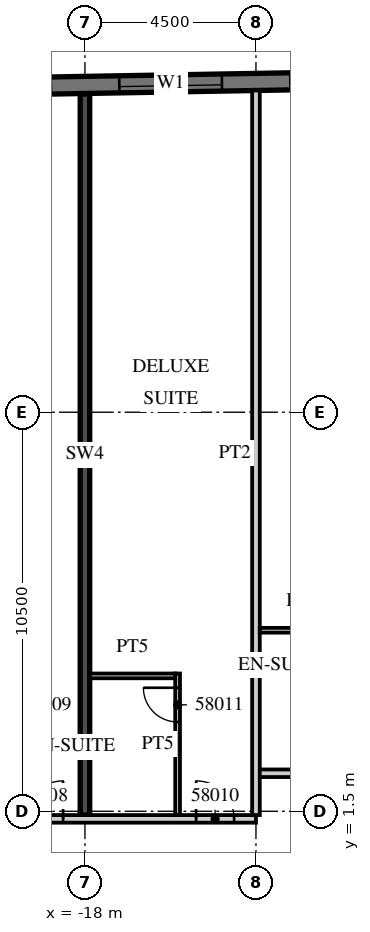
"""IFC4 building model, lengths in metres.
Left out: names, types, materials, properties, quantities, classifications, styles, units other than length and angle.
Written with IfcOpenShell. Run it as: python <this file> out.ifc"""

import sys

from ifc_helpers import new_model, si_unit, direction, frame, frame_2d, origin, place, context, subcontext, project, spatial, rectangle, extrude, element, fill, save


model = new_model("IFC4")
c1 = context("Model", 3, precision=1e-05, world=origin(), true_north=direction((0.0, 1.0)))
c2 = subcontext(c1, "Body", "Model", "MODEL_VIEW")
j1 = project(units=[si_unit("LENGTHUNIT", "METRE"), si_unit("PLANEANGLEUNIT", "RADIAN")], contexts=[c1])
p1 = place(None, origin())
s1 = spatial("IfcSite", under=j1, at=p1, CompositionType="ELEMENT")
p2 = place(p1, origin())
s2 = spatial("IfcBuilding", under=s1, at=p2, CompositionType="ELEMENT")
p3 = place(p2, frame((0.0, 0.0, 237.5)))
s3 = spatial("IfcBuildingStorey", under=s2, at=p3, CompositionType="ELEMENT", Elevation=237.5)
p4 = place(p3, frame((-18.0, 1.4, 0.0), z_axis=(0.0, 0.0, 1.0), x_axis=(0.0, 1.0, 0.0)))
e1 = element("IfcWall", 1, at=p4, inside=s3, PredefinedType="SHEAR", context=c2, shape_type="SweptSolid", body=[
    extrude(rectangle(XDim=18.974, YDim=0.25, at=frame_2d((9.487, 0.0))), origin(), (0.0, 0.0, 1.0), 3.3),
])
p5 = place(p3, frame((13.504, 21.161, 0.0), z_axis=(0.0, 0.0, 1.0), x_axis=(-0.999847763257, -0.017448504532, 0.0)))
e2 = element("IfcWall", 2, at=p5, inside=s3, PredefinedType="SOLIDWALL", context=c2, shape_type="SweptSolid", body=[
    extrude(rectangle(XDim=46.859, YDim=0.45, at=frame_2d((23.43, 0.0))), origin(), (0.0, 0.0, 1.0), 3.02),
])
p6 = place(p5, frame((0.9, 0.0, 0.45)))
e3 = element("IfcOpeningElement", 3, at=p6, cuts=e2, PredefinedType="OPENING", context=c2, shape_type="SweptSolid", body=[
    extrude(rectangle(XDim=2.7, YDim=2.25, at=frame_2d((1.35, 1.125))), frame((0.0, 0.235, 0.0), z_axis=(0.0, -1.0, 0.0), x_axis=(1.0, 0.0, 0.0)), (0.0, 0.0, 1.0), 0.47),
])
p7 = place(p5, frame((5.401, 0.0, 0.45)))
e4 = element("IfcOpeningElement", 4, at=p7, cuts=e2, PredefinedType="OPENING", context=c2, shape_type="SweptSolid", body=[
    extrude(rectangle(XDim=2.7, YDim=2.25, at=frame_2d((1.35, 1.125))), frame((0.0, 0.235, 0.0), z_axis=(0.0, -1.0, 0.0), x_axis=(1.0, 0.0, 0.0)), (0.0, 0.0, 1.0), 0.47),
])
p8 = place(p5, frame((9.902, 0.0, 0.45)))
e5 = element("IfcOpeningElement", 5, at=p8, cuts=e2, PredefinedType="OPENING", context=c2, shape_type="SweptSolid", body=[
    extrude(rectangle(XDim=2.7, YDim=2.25, at=frame_2d((1.35, 1.125))), frame((0.0, 0.235, 0.0), z_axis=(0.0, -1.0, 0.0), x_axis=(1.0, 0.0, 0.0)), (0.0, 0.0, 1.0), 0.47),
])
p9 = place(p5, frame((14.402, 0.0, 0.45)))
e6 = element("IfcOpeningElement", 6, at=p9, cuts=e2, PredefinedType="OPENING", context=c2, shape_type="SweptSolid", body=[
    extrude(rectangle(XDim=2.7, YDim=2.25, at=frame_2d((1.35, 1.125))), frame((0.0, 0.235, 0.0), z_axis=(0.0, -1.0, 0.0), x_axis=(1.0, 0.0, 0.0)), (0.0, 0.0, 1.0), 0.47),
])
p10 = place(p5, frame((18.903, 0.0, 0.45)))
e7 = element("IfcOpeningElement", 7, at=p10, cuts=e2, PredefinedType="OPENING", context=c2, shape_type="SweptSolid", body=[
    extrude(rectangle(XDim=2.7, YDim=2.25, at=frame_2d((1.35, 1.125))), frame((0.0, 0.235, 0.0), z_axis=(0.0, -1.0, 0.0), x_axis=(1.0, 0.0, 0.0)), (0.0, 0.0, 1.0), 0.47),
])
p11 = place(p5, frame((23.404, 0.0, 0.45)))
e8 = element("IfcOpeningElement", 8, at=p11, cuts=e2, PredefinedType="OPENING", context=c2, shape_type="SweptSolid", body=[
    extrude(rectangle(XDim=2.7, YDim=2.25, at=frame_2d((1.35, 1.125))), frame((0.0, 0.235, 0.0), z_axis=(0.0, -1.0, 0.0), x_axis=(1.0, 0.0, 0.0)), (0.0, 0.0, 1.0), 0.47),
])
p12 = place(p5, frame((27.904, 0.0, 0.45)))
e9 = element("IfcOpeningElement", 9, at=p12, cuts=e2, PredefinedType="OPENING", context=c2, shape_type="SweptSolid", body=[
    extrude(rectangle(XDim=2.7, YDim=2.25, at=frame_2d((1.35, 1.125))), frame((0.0, 0.235, 0.0), z_axis=(0.0, -1.0, 0.0), x_axis=(1.0, 0.0, 0.0)), (0.0, 0.0, 1.0), 0.47),
])
p13 = place(p5, frame((32.405, 0.0, 0.45)))
e10 = element("IfcOpeningElement", 10, at=p13, cuts=e2, PredefinedType="OPENING", context=c2, shape_type="SweptSolid", body=[
    extrude(rectangle(XDim=2.7, YDim=2.25, at=frame_2d((1.35, 1.125))), frame((0.0, 0.235, 0.0), z_axis=(0.0, -1.0, 0.0), x_axis=(1.0, 0.0, 0.0)), (0.0, 0.0, 1.0), 0.47),
])
p14 = place(p5, frame((36.906, 0.0, 0.45)))
e11 = element("IfcOpeningElement", 11, at=p14, cuts=e2, PredefinedType="OPENING", context=c2, shape_type="SweptSolid", body=[
    extrude(rectangle(XDim=2.7, YDim=2.25, at=frame_2d((1.35, 1.125))), frame((0.0, 0.235, 0.0), z_axis=(0.0, -1.0, 0.0), x_axis=(1.0, 0.0, 0.0)), (0.0, 0.0, 1.0), 0.47),
])
p15 = place(p5, frame((41.406, 0.0, 0.45)))
e12 = element("IfcOpeningElement", 12, at=p15, cuts=e2, PredefinedType="OPENING", context=c2, shape_type="SweptSolid", body=[
    extrude(rectangle(XDim=2.7, YDim=2.25, at=frame_2d((1.35, 1.125))), frame((0.0, 0.235, 0.0), z_axis=(0.0, -1.0, 0.0), x_axis=(1.0, 0.0, 0.0)), (0.0, 0.0, 1.0), 0.47),
])
p16 = place(p3, frame((-36.566, 1.3, 0.0), z_axis=(0.0, 0.0, 1.0), x_axis=(1.0, 0.0, 0.0)))
e13 = element("IfcWall", 13, at=p16, inside=s3, PredefinedType="PARTITIONING", context=c2, shape_type="SweptSolid", body=[
    extrude(rectangle(XDim=23.066, YDim=0.2, at=frame_2d((11.533, 0.0))), origin(), (0.0, 0.0, 1.0), 3.02),
])
p17 = place(p16, frame((1.141, 0.0, 0.0)))
e14 = element("IfcOpeningElement", 14, at=p17, cuts=e13, PredefinedType="OPENING", context=c2, shape_type="SweptSolid", body=[
    extrude(rectangle(XDim=1.0, YDim=2.1, at=frame_2d((0.5, 1.05))), frame((0.0, 0.11, 0.0), z_axis=(0.0, -1.0, 0.0), x_axis=(1.0, 0.0, 0.0)), (0.0, 0.0, 1.0), 0.22),
])
p18 = place(p16, frame((5.616, 0.0, 0.0)))
e15 = element("IfcOpeningElement", 15, at=p18, cuts=e13, PredefinedType="OPENING", context=c2, shape_type="SweptSolid", body=[
    extrude(rectangle(XDim=1.0, YDim=2.1, at=frame_2d((0.5, 1.05))), frame((0.0, 0.11, 0.0), z_axis=(0.0, -1.0, 0.0), x_axis=(1.0, 0.0, 0.0)), (0.0, 0.0, 1.0), 0.22),
])
p19 = place(p16, frame((10.141, 0.0, 0.0)))
e16 = element("IfcOpeningElement", 16, at=p19, cuts=e13, PredefinedType="OPENING", context=c2, shape_type="SweptSolid", body=[
    extrude(rectangle(XDim=1.0, YDim=2.1, at=frame_2d((0.5, 1.05))), frame((0.0, 0.11, 0.0), z_axis=(0.0, -1.0, 0.0), x_axis=(1.0, 0.0, 0.0)), (0.0, 0.0, 1.0), 0.22),
])
p20 = place(p16, frame((16.991, 0.0, 0.0)))
e17 = element("IfcOpeningElement", 17, at=p20, cuts=e13, PredefinedType="OPENING", context=c2, shape_type="SweptSolid", body=[
    extrude(rectangle(XDim=1.0, YDim=2.1, at=frame_2d((0.5, 1.05))), frame((0.0, 0.11, 0.0), z_axis=(0.0, -1.0, 0.0), x_axis=(1.0, 0.0, 0.0)), (0.0, 0.0, 1.0), 0.22),
])
p21 = place(p16, frame((21.491, 0.0, 0.0)))
e18 = element("IfcOpeningElement", 18, at=p21, cuts=e13, PredefinedType="OPENING", context=c2, shape_type="SweptSolid", body=[
    extrude(rectangle(XDim=1.0, YDim=2.1, at=frame_2d((0.5, 1.05))), frame((0.0, 0.11, 0.0), z_axis=(0.0, -1.0, 0.0), x_axis=(1.0, 0.0, 0.0)), (0.0, 0.0, 1.0), 0.22),
])
p22 = place(p3, frame((-13.5, 2.5, 0.0), z_axis=(0.0, 0.0, 1.0), x_axis=(1.0, 0.0, 0.0)))
e19 = element("IfcWall", 19, at=p22, inside=s3, PredefinedType="PARTITIONING", context=c2, shape_type="SweptSolid", body=[
    extrude(rectangle(XDim=27.0, YDim=0.2, at=frame_2d((13.5, 0.0))), origin(), (0.0, 0.0, 1.0), 3.02),
])
p23 = place(p22, frame((2.925, 0.0, 0.0)))
e20 = element("IfcOpeningElement", 20, at=p23, cuts=e19, PredefinedType="OPENING", context=c2, shape_type="SweptSolid", body=[
    extrude(rectangle(XDim=1.0, YDim=2.1, at=frame_2d((0.5, 1.05))), frame((0.0, 0.11, 0.0), z_axis=(0.0, -1.0, 0.0), x_axis=(1.0, 0.0, 0.0)), (0.0, 0.0, 1.0), 0.22),
])
p24 = place(p22, frame((7.45, 0.0, 0.0)))
e21 = element("IfcOpeningElement", 21, at=p24, cuts=e19, PredefinedType="OPENING", context=c2, shape_type="SweptSolid", body=[
    extrude(rectangle(XDim=1.0, YDim=2.1, at=frame_2d((0.5, 1.05))), frame((0.0, 0.11, 0.0), z_axis=(0.0, -1.0, 0.0), x_axis=(1.0, 0.0, 0.0)), (0.0, 0.0, 1.0), 0.22),
])
p25 = place(p22, frame((11.925, 0.0, 0.0)))
e22 = element("IfcOpeningElement", 22, at=p25, cuts=e19, PredefinedType="OPENING", context=c2, shape_type="SweptSolid", body=[
    extrude(rectangle(XDim=1.0, YDim=2.1, at=frame_2d((0.5, 1.05))), frame((0.0, 0.11, 0.0), z_axis=(0.0, -1.0, 0.0), x_axis=(1.0, 0.0, 0.0)), (0.0, 0.0, 1.0), 0.22),
])
p26 = place(p22, frame((16.45, 0.0, 0.0)))
e23 = element("IfcOpeningElement", 23, at=p26, cuts=e19, PredefinedType="OPENING", context=c2, shape_type="SweptSolid", body=[
    extrude(rectangle(XDim=1.0, YDim=2.1, at=frame_2d((0.5, 1.05))), frame((0.0, 0.11, 0.0), z_axis=(0.0, -1.0, 0.0), x_axis=(1.0, 0.0, 0.0)), (0.0, 0.0, 1.0), 0.22),
])
p27 = place(p22, frame((18.55, 0.0, 0.0)))
e24 = element("IfcOpeningElement", 24, at=p27, cuts=e19, PredefinedType="OPENING", context=c2, shape_type="SweptSolid", body=[
    extrude(rectangle(XDim=1.0, YDim=2.1, at=frame_2d((0.5, 1.05))), frame((0.0, 0.11, 0.0), z_axis=(0.0, -1.0, 0.0), x_axis=(1.0, 0.0, 0.0)), (0.0, 0.0, 1.0), 0.22),
])
p28 = place(p22, frame((23.075, 0.0, 0.0)))
e25 = element("IfcOpeningElement", 25, at=p28, cuts=e19, PredefinedType="OPENING", context=c2, shape_type="SweptSolid", body=[
    extrude(rectangle(XDim=1.0, YDim=2.1, at=frame_2d((0.5, 1.05))), frame((0.0, 0.11, 0.0), z_axis=(0.0, -1.0, 0.0), x_axis=(1.0, 0.0, 0.0)), (0.0, 0.0, 1.0), 0.22),
])
p29 = place(p3, frame((-13.5, 1.4, 0.0), z_axis=(0.0, 0.0, 1.0), x_axis=(0.0, 1.0, 0.0)))
e26 = element("IfcWall", 26, at=p29, inside=s3, PredefinedType="PARTITIONING", context=c2, shape_type="SweptSolid", body=[
    extrude(rectangle(XDim=19.065, YDim=0.2, at=frame_2d((9.533, 0.0))), origin(), (0.0, 0.0, 1.0), 3.02),
])
p30 = place(p3, frame((-15.562, 1.4, 0.0), z_axis=(0.0, 0.0, 1.0), x_axis=(0.0, 1.0, 0.0)))
e27 = element("IfcWall", 27, at=p30, inside=s3, PredefinedType="PARTITIONING", context=c2, shape_type="SweptSolid", body=[
    extrude(rectangle(XDim=3.725, YDim=0.125, at=frame_2d((1.863, 0.0))), origin(), (0.0, 0.0, 1.0), 3.02),
])
p31 = place(p30, frame((2.45, 0.0, 0.0)))
e28 = element("IfcOpeningElement", 28, at=p31, cuts=e27, PredefinedType="OPENING", context=c2, shape_type="SweptSolid", body=[
    extrude(rectangle(XDim=0.9, YDim=2.1, at=frame_2d((0.45, 1.05))), frame((0.0, 0.073, 0.0), z_axis=(0.0, -1.0, 0.0), x_axis=(1.0, 0.0, 0.0)), (0.0, 0.0, 1.0), 0.145),
])
for number, where, z_axis, x_axis in (
    (29, (-17.875, 5.062, 0.0), (0.0, 0.0, 1.0), (1.0, 0.0, 0.0)),
    (30, (-13.4, 6.263, 0.0), (0.0, 0.0, 1.0), (1.0, 0.0, 0.0)),
):
    element("IfcWall", number, at=place(p3, frame(where, z_axis=z_axis, x_axis=x_axis)), inside=s3, PredefinedType="PARTITIONING", context=c2, shape_type="SweptSolid", body=[
        extrude(rectangle(XDim=2.25, YDim=0.125, at=frame_2d((1.125, 0.0))), origin(), (0.0, 0.0, 1.0), 3.02),
    ])
p32 = place(p12, origin())
e31 = element("IfcWindow", 31, at=p32, inside=s3, PartitioningType="SINGLE_PANEL", PredefinedType="WINDOW", context=c2, shape_type="SweptSolid", body=[
    extrude(rectangle(XDim=2.7, YDim=2.25, at=frame_2d((1.35, 1.125))), frame((0.0, 0.09, 0.0), z_axis=(0.0, -1.0, 0.0), x_axis=(1.0, 0.0, 0.0)), (0.0, 0.0, 1.0), 0.06),
])
fill(e9, e31)
p33 = place(p20, origin())
e32 = element("IfcDoor", 32, at=p33, inside=s3, OperationType="SINGLE_SWING_RIGHT", PredefinedType="DOOR", context=c2, shape_type="SweptSolid", body=[
    extrude(rectangle(XDim=1.0, YDim=2.1, at=frame_2d((0.5, 1.05))), frame((0.0, 0.025, 0.0), z_axis=(0.0, -1.0, 0.0), x_axis=(1.0, 0.0, 0.0)), (0.0, 0.0, 1.0), 0.05),
])
fill(e17, e32)
p34 = place(p21, origin())
e33 = element("IfcDoor", 33, at=p34, inside=s3, OperationType="SINGLE_SWING_LEFT", PredefinedType="DOOR", context=c2, shape_type="SweptSolid", body=[
    extrude(rectangle(XDim=1.0, YDim=2.1, at=frame_2d((0.5, 1.05))), frame((0.0, 0.025, 0.0), z_axis=(0.0, -1.0, 0.0), x_axis=(1.0, 0.0, 0.0)), (0.0, 0.0, 1.0), 0.05),
])
fill(e18, e33)
p35 = place(p31, origin())
e34 = element("IfcDoor", 34, at=p35, inside=s3, OperationType="SINGLE_SWING_RIGHT", PredefinedType="DOOR", context=c2, shape_type="SweptSolid", body=[
    extrude(rectangle(XDim=0.9, YDim=2.1, at=frame_2d((0.45, 1.05))), frame((0.0, 0.025, 0.0), z_axis=(0.0, -1.0, 0.0), x_axis=(1.0, 0.0, 0.0)), (0.0, 0.0, 1.0), 0.05),
])
fill(e28, e34)
save(model, sys.argv[1])
